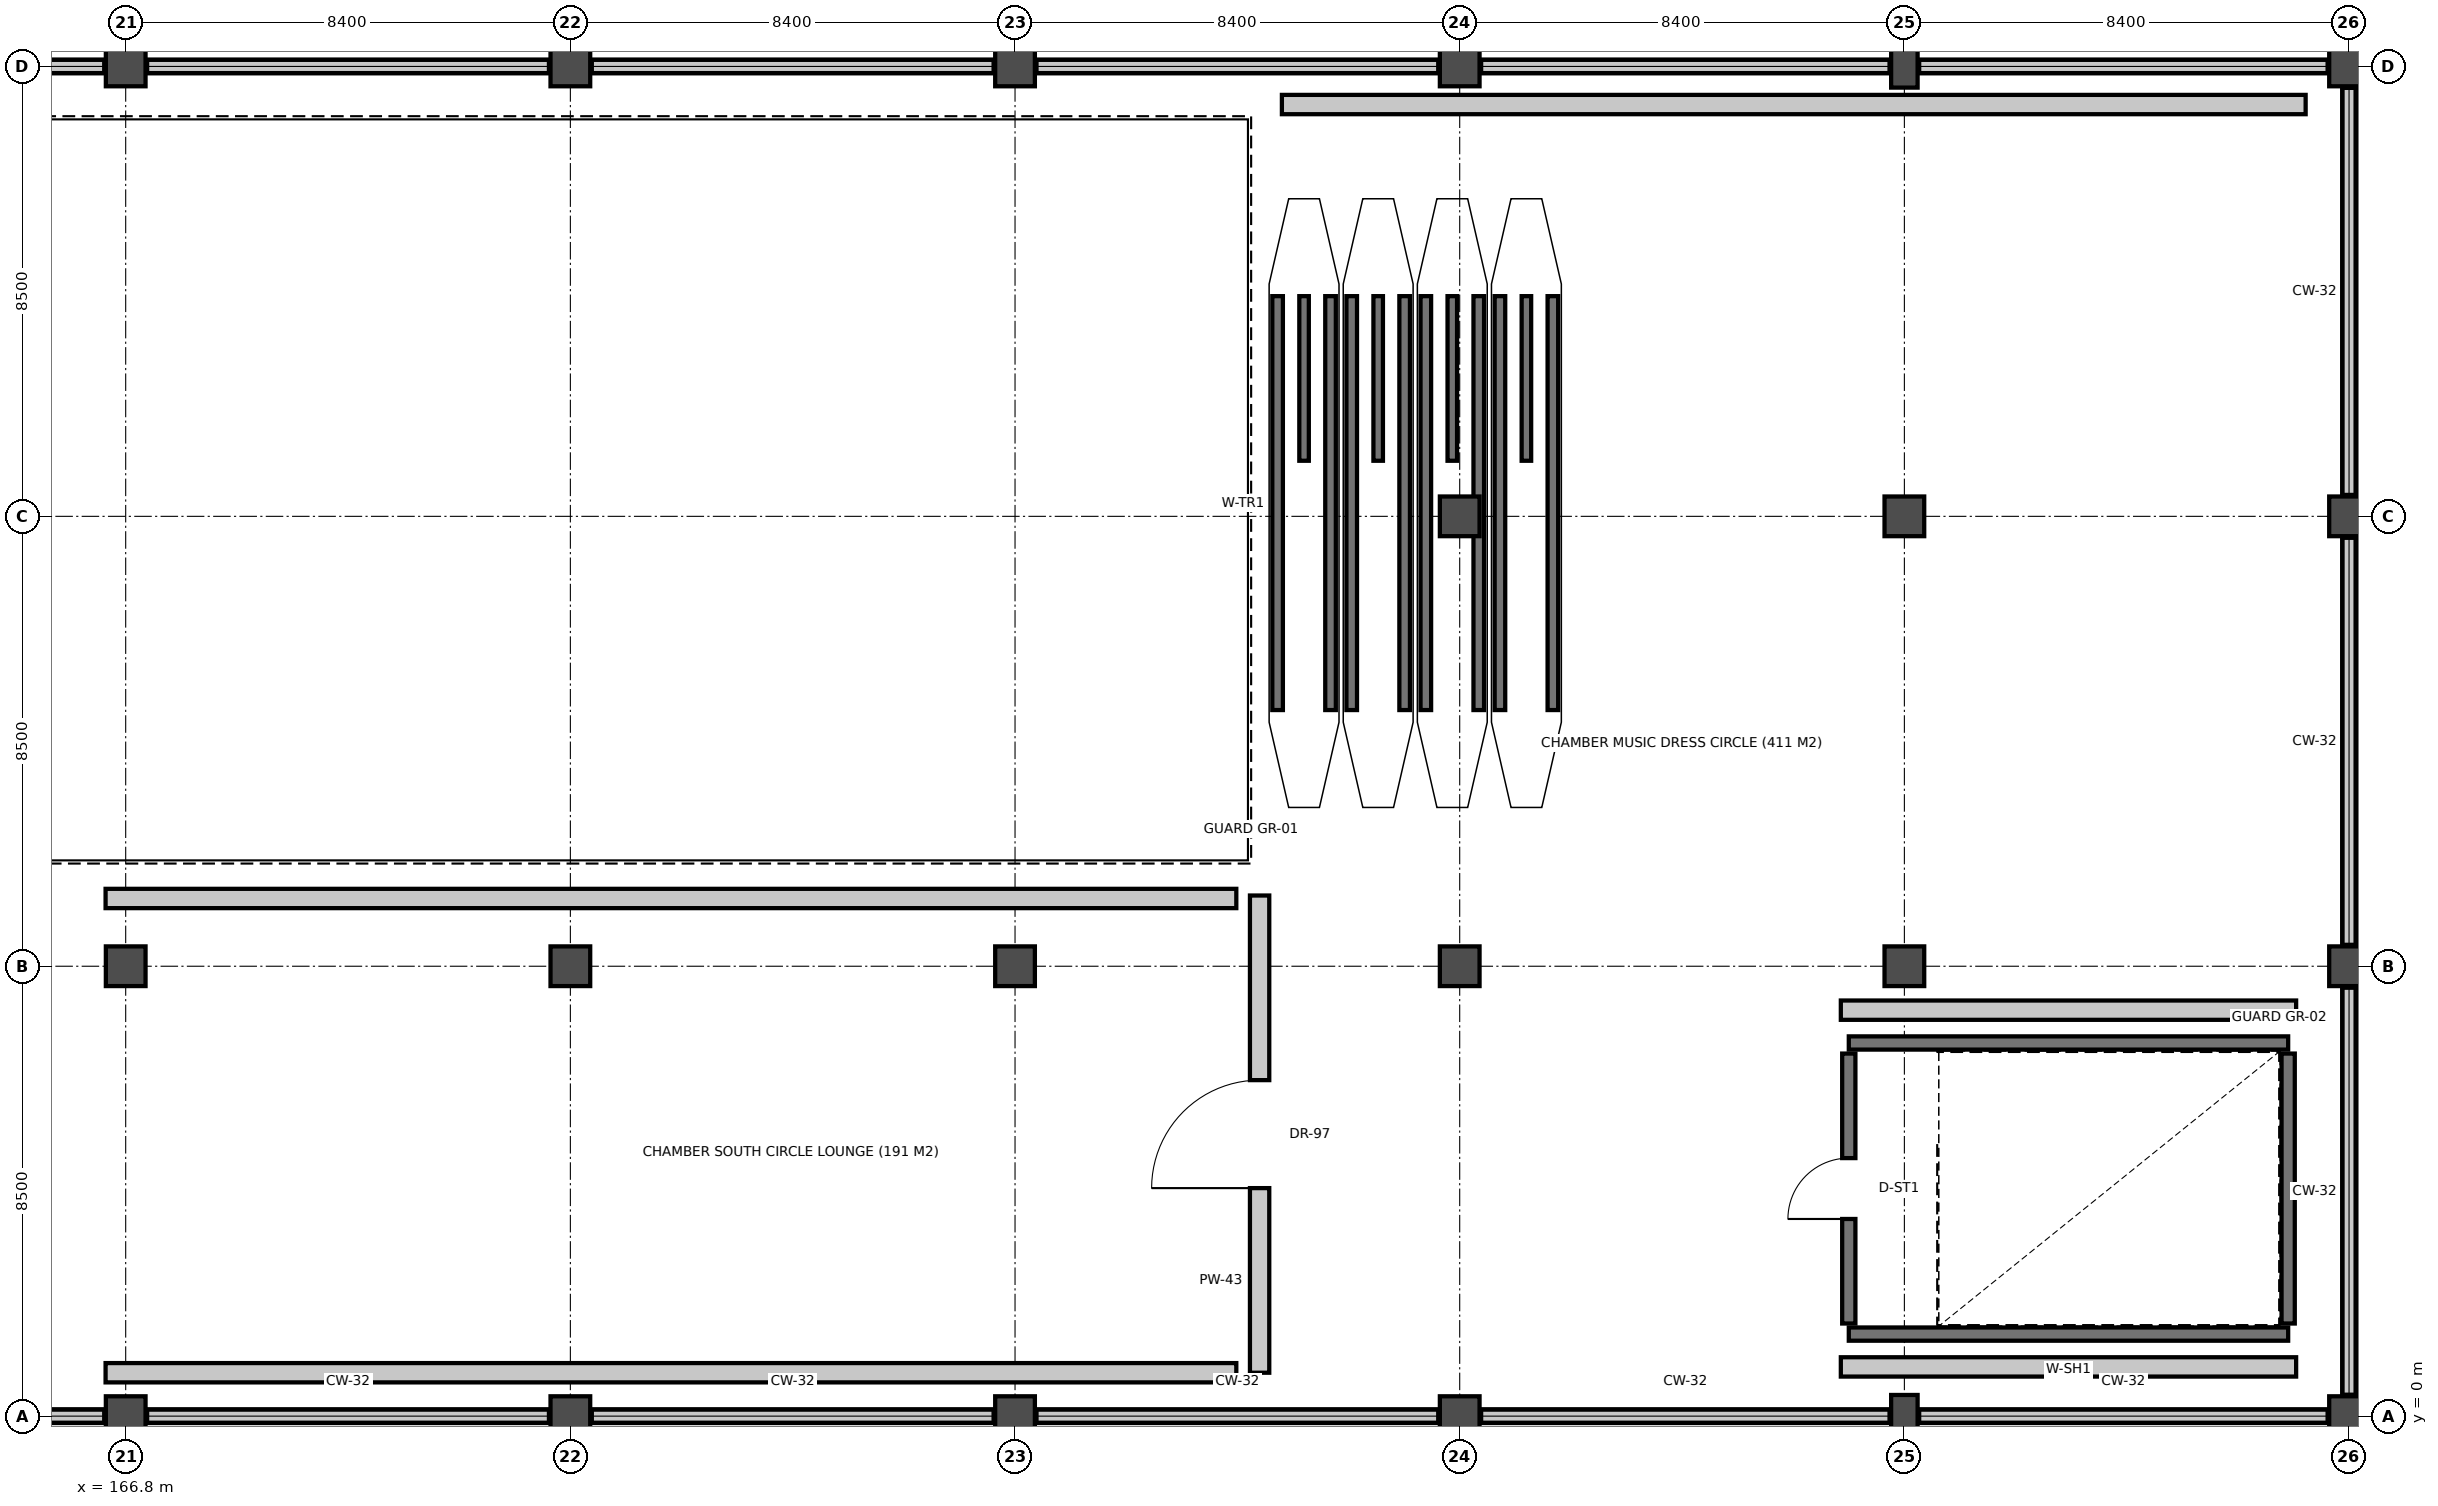
"""IFC4 building model, lengths in metres.
Left out: names, types, materials, properties, quantities, classifications, styles, units other than length and angle.
Written with IfcOpenShell. Run it as: python <this file> out.ifc"""

import sys

from ifc_helpers import new_model, si_unit, direction, frame, frame_2d, origin, origin_2d, place, context, subcontext, project, spatial, rectangle, extrude, element, fill, save


model = new_model("IFC4")
c1 = context("Model", 3, precision=1e-05, world=origin(), true_north=direction((0.0, 1.0)))
c2 = subcontext(c1, "Body", "Model", "MODEL_VIEW")
j1 = project(units=[si_unit("LENGTHUNIT", "METRE"), si_unit("PLANEANGLEUNIT", "RADIAN")], contexts=[c1])
p1 = place(None, origin())
s1 = spatial("IfcSite", under=j1, at=p1, CompositionType="ELEMENT")
p2 = place(p1, origin())
s2 = spatial("IfcBuilding", under=s1, at=p2, CompositionType="ELEMENT")
p3 = place(p2, frame((0.0, 0.0, 10.2)))
s3 = spatial("IfcBuildingStorey", under=s2, at=p3, CompositionType="ELEMENT", Elevation=10.2)
for number, where, z_axis, x_axis in (
    (1, (166.8, 0.0, 0.0), (0.0, 0.0, 1.0), (1.0, 0.0, 0.0)),
    (2, (166.8, 8.5, 0.0), (0.0, 0.0, 1.0), (1.0, 0.0, 0.0)),
    (3, (166.8, 25.5, 0.0), (0.0, 0.0, 1.0), (1.0, 0.0, 0.0)),
    (4, (175.2, 0.0, 0.0), (0.0, 0.0, 1.0), (1.0, 0.0, 0.0)),
    (5, (175.2, 8.5, 0.0), (0.0, 0.0, 1.0), (1.0, 0.0, 0.0)),
    (6, (175.2, 25.5, 0.0), (0.0, 0.0, 1.0), (1.0, 0.0, 0.0)),
    (7, (183.6, 0.0, 0.0), (0.0, 0.0, 1.0), (1.0, 0.0, 0.0)),
    (8, (183.6, 8.5, 0.0), (0.0, 0.0, 1.0), (1.0, 0.0, 0.0)),
    (9, (183.6, 25.5, 0.0), (0.0, 0.0, 1.0), (1.0, 0.0, 0.0)),
    (10, (192.0, 0.0, 0.0), (0.0, 0.0, 1.0), (1.0, 0.0, 0.0)),
    (11, (192.0, 8.5, 0.0), (0.0, 0.0, 1.0), (1.0, 0.0, 0.0)),
    (12, (192.0, 17.0, 0.0), (0.0, 0.0, 1.0), (1.0, 0.0, 0.0)),
    (13, (192.0, 25.5, 0.0), (0.0, 0.0, 1.0), (1.0, 0.0, 0.0)),
):
    element("IfcColumn", number, at=place(p3, frame(where, z_axis=z_axis, x_axis=x_axis)), inside=s3, PredefinedType="COLUMN", context=c2, shape_type="SweptSolid", body=[
        extrude(rectangle(XDim=0.75, YDim=0.75, at=origin_2d()), origin(), (0.0, 0.0, 1.0), 4.8),
    ])
p4 = place(p3, frame((200.4, 0.0, 0.0), z_axis=(0.0, 0.0, 1.0), x_axis=(1.0, 0.0, 0.0)))
e14 = element("IfcColumn", 14, at=p4, inside=s3, PredefinedType="PILASTER", context=c2, shape_type="SweptSolid", body=[
    extrude(rectangle(XDim=0.5, YDim=0.8, at=origin_2d()), origin(), (0.0, 0.0, 1.0), 4.8),
])
for number, where, z_axis, x_axis in (
    (15, (200.4, 8.5, 0.0), (0.0, 0.0, 1.0), (1.0, 0.0, 0.0)),
    (16, (200.4, 17.0, 0.0), (0.0, 0.0, 1.0), (1.0, 0.0, 0.0)),
):
    element("IfcColumn", number, at=place(p3, frame(where, z_axis=z_axis, x_axis=x_axis)), inside=s3, PredefinedType="COLUMN", context=c2, shape_type="SweptSolid", body=[
        extrude(rectangle(XDim=0.75, YDim=0.75, at=origin_2d()), origin(), (0.0, 0.0, 1.0), 4.8),
    ])
p5 = place(p3, frame((200.4, 25.5, 0.0), z_axis=(0.0, 0.0, 1.0), x_axis=(1.0, 0.0, 0.0)))
e17 = element("IfcColumn", 17, at=p5, inside=s3, PredefinedType="PILASTER", context=c2, shape_type="SweptSolid", body=[
    extrude(rectangle(XDim=0.5, YDim=0.8, at=origin_2d()), origin(), (0.0, 0.0, 1.0), 4.8),
])
for number, where, z_axis, x_axis in (
    (18, (208.8, 0.0, 0.0), (0.0, 0.0, 1.0), (1.0, 0.0, 0.0)),
    (19, (208.8, 8.5, 0.0), (0.0, 0.0, 1.0), (1.0, 0.0, 0.0)),
    (20, (208.8, 17.0, 0.0), (0.0, 0.0, 1.0), (1.0, 0.0, 0.0)),
    (21, (208.8, 25.5, 0.0), (0.0, 0.0, 1.0), (1.0, 0.0, 0.0)),
):
    element("IfcColumn", number, at=place(p3, frame(where, z_axis=z_axis, x_axis=x_axis)), inside=s3, PredefinedType="COLUMN", context=c2, shape_type="SweptSolid", body=[
        extrude(rectangle(XDim=0.75, YDim=0.75, at=origin_2d()), origin(), (0.0, 0.0, 1.0), 4.8),
    ])
for number, where, z_axis, x_axis in (
    (22, (188.56, 13.34, 0.0), (0.0, 0.0, 1.0), (0.0, 1.0, 0.0)),
    (23, (189.56, 13.34, 0.0), (0.0, 0.0, 1.0), (0.0, 1.0, 0.0)),
):
    element("IfcWall", number, at=place(p3, frame(where, z_axis=z_axis, x_axis=x_axis)), inside=s3, PredefinedType="SHEAR", context=c2, shape_type="SweptSolid", body=[
        extrude(rectangle(XDim=7.82, YDim=0.2, at=frame_2d((3.91, 0.0))), origin(), (0.0, 0.0, 1.0), 0.21),
    ])
p6 = place(p3, frame((189.06, 18.05, 0.0), z_axis=(0.0, 0.0, 1.0), x_axis=(0.0, 1.0, 0.0)))
e24 = element("IfcWall", 24, at=p6, inside=s3, PredefinedType="SHEAR", context=c2, shape_type="SweptSolid", body=[
    extrude(rectangle(XDim=3.11, YDim=0.18, at=frame_2d((1.555, 0.0))), origin(), (0.0, 0.0, 1.0), 0.21),
])
for number, where, z_axis, x_axis in (
    (25, (189.96, 13.34, 0.0), (0.0, 0.0, 1.0), (0.0, 1.0, 0.0)),
    (26, (190.96, 13.34, 0.0), (0.0, 0.0, 1.0), (0.0, 1.0, 0.0)),
):
    element("IfcWall", number, at=place(p3, frame(where, z_axis=z_axis, x_axis=x_axis)), inside=s3, PredefinedType="SHEAR", context=c2, shape_type="SweptSolid", body=[
        extrude(rectangle(XDim=7.82, YDim=0.2, at=frame_2d((3.91, 0.0))), origin(), (0.0, 0.0, 1.0), 0.39),
    ])
p7 = place(p3, frame((190.46, 18.05, 0.0), z_axis=(0.0, 0.0, 1.0), x_axis=(0.0, 1.0, 0.0)))
e27 = element("IfcWall", 27, at=p7, inside=s3, PredefinedType="SHEAR", context=c2, shape_type="SweptSolid", body=[
    extrude(rectangle(XDim=3.11, YDim=0.18, at=frame_2d((1.555, 0.0))), origin(), (0.0, 0.0, 1.0), 0.39),
])
for number, where, z_axis, x_axis in (
    (28, (191.36, 13.34, 0.0), (0.0, 0.0, 1.0), (0.0, 1.0, 0.0)),
    (29, (192.36, 13.34, 0.0), (0.0, 0.0, 1.0), (0.0, 1.0, 0.0)),
):
    element("IfcWall", number, at=place(p3, frame(where, z_axis=z_axis, x_axis=x_axis)), inside=s3, PredefinedType="SHEAR", context=c2, shape_type="SweptSolid", body=[
        extrude(rectangle(XDim=7.82, YDim=0.2, at=frame_2d((3.91, 0.0))), origin(), (0.0, 0.0, 1.0), 0.57),
    ])
p8 = place(p3, frame((191.86, 18.05, 0.0), z_axis=(0.0, 0.0, 1.0), x_axis=(0.0, 1.0, 0.0)))
e30 = element("IfcWall", 30, at=p8, inside=s3, PredefinedType="SHEAR", context=c2, shape_type="SweptSolid", body=[
    extrude(rectangle(XDim=3.11, YDim=0.18, at=frame_2d((1.555, 0.0))), origin(), (0.0, 0.0, 1.0), 0.57),
])
for number, where, z_axis, x_axis in (
    (31, (192.76, 13.34, 0.0), (0.0, 0.0, 1.0), (0.0, 1.0, 0.0)),
    (32, (193.76, 13.34, 0.0), (0.0, 0.0, 1.0), (0.0, 1.0, 0.0)),
):
    element("IfcWall", number, at=place(p3, frame(where, z_axis=z_axis, x_axis=x_axis)), inside=s3, PredefinedType="SHEAR", context=c2, shape_type="SweptSolid", body=[
        extrude(rectangle(XDim=7.82, YDim=0.2, at=frame_2d((3.91, 0.0))), origin(), (0.0, 0.0, 1.0), 0.75),
    ])
p9 = place(p3, frame((193.26, 18.05, 0.0), z_axis=(0.0, 0.0, 1.0), x_axis=(0.0, 1.0, 0.0)))
e33 = element("IfcWall", 33, at=p9, inside=s3, PredefinedType="SHEAR", context=c2, shape_type="SweptSolid", body=[
    extrude(rectangle(XDim=3.11, YDim=0.18, at=frame_2d((1.555, 0.0))), origin(), (0.0, 0.0, 1.0), 0.75),
])
p10 = place(p3, frame((158.67, 25.5, 0.0), z_axis=(0.0, 0.0, 1.0), x_axis=(1.0, 0.0, 0.0)))
e34 = element("IfcWall", 34, at=p10, inside=s3, PredefinedType="PARAPET", context=c2, shape_type="SweptSolid", body=[
    extrude(rectangle(XDim=7.735, YDim=0.26, at=frame_2d((3.868, 0.0))), origin(), (0.0, 0.0, 1.0), 1.12),
])
p11 = place(p3, frame((167.195, 25.5, 0.0), z_axis=(0.0, 0.0, 1.0), x_axis=(1.0, 0.0, 0.0)))
e35 = element("IfcWall", 35, at=p11, inside=s3, PredefinedType="PARAPET", context=c2, shape_type="SweptSolid", body=[
    extrude(rectangle(XDim=7.61, YDim=0.26, at=frame_2d((3.805, 0.0))), origin(), (0.0, 0.0, 1.0), 1.12),
])
p12 = place(p3, frame((175.595, 25.5, 0.0), z_axis=(0.0, 0.0, 1.0), x_axis=(1.0, 0.0, 0.0)))
e36 = element("IfcWall", 36, at=p12, inside=s3, PredefinedType="PARAPET", context=c2, shape_type="SweptSolid", body=[
    extrude(rectangle(XDim=7.61, YDim=0.26, at=frame_2d((3.805, 0.0))), origin(), (0.0, 0.0, 1.0), 1.12),
])
p13 = place(p3, frame((183.995, 25.5, 0.0), z_axis=(0.0, 0.0, 1.0), x_axis=(1.0, 0.0, 0.0)))
e37 = element("IfcWall", 37, at=p13, inside=s3, PredefinedType="PARAPET", context=c2, shape_type="SweptSolid", body=[
    extrude(rectangle(XDim=7.61, YDim=0.26, at=frame_2d((3.805, 0.0))), origin(), (0.0, 0.0, 1.0), 1.12),
])
p14 = place(p3, frame((192.395, 25.5, 0.0), z_axis=(0.0, 0.0, 1.0), x_axis=(1.0, 0.0, 0.0)))
e38 = element("IfcWall", 38, at=p14, inside=s3, PredefinedType="PARAPET", context=c2, shape_type="SweptSolid", body=[
    extrude(rectangle(XDim=7.735, YDim=0.26, at=frame_2d((3.867, 0.0))), origin(), (0.0, 0.0, 1.0), 1.12),
])
p15 = place(p3, frame((200.67, 25.5, 0.0), z_axis=(0.0, 0.0, 1.0), x_axis=(1.0, 0.0, 0.0)))
e39 = element("IfcWall", 39, at=p15, inside=s3, PredefinedType="PARAPET", context=c2, shape_type="SweptSolid", body=[
    extrude(rectangle(XDim=7.735, YDim=0.26, at=frame_2d((3.868, 0.0))), origin(), (0.0, 0.0, 1.0), 1.12),
])
for number, where, z_axis, x_axis in (
    (40, (208.8, 8.105, 0.0), (0.0, 0.0, 1.0), (0.0, -1.0, 0.0)),
    (41, (208.8, 16.605, 0.0), (0.0, 0.0, 1.0), (0.0, -1.0, 0.0)),
    (42, (208.8, 25.105, 0.0), (0.0, 0.0, 1.0), (0.0, -1.0, 0.0)),
):
    element("IfcWall", number, at=place(p3, frame(where, z_axis=z_axis, x_axis=x_axis)), inside=s3, PredefinedType="PARAPET", context=c2, shape_type="SweptSolid", body=[
        extrude(rectangle(XDim=7.71, YDim=0.26, at=frame_2d((3.855, 0.0))), origin(), (0.0, 0.0, 1.0), 1.12),
    ])
p16 = place(p3, frame((166.405, 0.0, 0.0), z_axis=(0.0, 0.0, 1.0), x_axis=(-1.0, 0.0, 0.0)))
e43 = element("IfcWall", 43, at=p16, inside=s3, PredefinedType="PARAPET", context=c2, shape_type="SweptSolid", body=[
    extrude(rectangle(XDim=7.735, YDim=0.26, at=frame_2d((3.868, 0.0))), origin(), (0.0, 0.0, 1.0), 1.12),
])
p17 = place(p3, frame((174.805, 0.0, 0.0), z_axis=(0.0, 0.0, 1.0), x_axis=(-1.0, 0.0, 0.0)))
e44 = element("IfcWall", 44, at=p17, inside=s3, PredefinedType="PARAPET", context=c2, shape_type="SweptSolid", body=[
    extrude(rectangle(XDim=7.61, YDim=0.26, at=frame_2d((3.805, 0.0))), origin(), (0.0, 0.0, 1.0), 1.12),
])
p18 = place(p3, frame((183.205, 0.0, 0.0), z_axis=(0.0, 0.0, 1.0), x_axis=(-1.0, 0.0, 0.0)))
e45 = element("IfcWall", 45, at=p18, inside=s3, PredefinedType="PARAPET", context=c2, shape_type="SweptSolid", body=[
    extrude(rectangle(XDim=7.61, YDim=0.26, at=frame_2d((3.805, 0.0))), origin(), (0.0, 0.0, 1.0), 1.12),
])
p19 = place(p3, frame((191.605, 0.0, 0.0), z_axis=(0.0, 0.0, 1.0), x_axis=(-1.0, 0.0, 0.0)))
e46 = element("IfcWall", 46, at=p19, inside=s3, PredefinedType="PARAPET", context=c2, shape_type="SweptSolid", body=[
    extrude(rectangle(XDim=7.61, YDim=0.26, at=frame_2d((3.805, 0.0))), origin(), (0.0, 0.0, 1.0), 1.12),
])
p20 = place(p3, frame((200.13, 0.0, 0.0), z_axis=(0.0, 0.0, 1.0), x_axis=(-1.0, 0.0, 0.0)))
e47 = element("IfcWall", 47, at=p20, inside=s3, PredefinedType="PARAPET", context=c2, shape_type="SweptSolid", body=[
    extrude(rectangle(XDim=7.735, YDim=0.26, at=frame_2d((3.867, 0.0))), origin(), (0.0, 0.0, 1.0), 1.12),
])
p21 = place(p3, frame((208.405, 0.0, 0.0), z_axis=(0.0, 0.0, 1.0), x_axis=(-1.0, 0.0, 0.0)))
e48 = element("IfcWall", 48, at=p21, inside=s3, PredefinedType="PARAPET", context=c2, shape_type="SweptSolid", body=[
    extrude(rectangle(XDim=7.735, YDim=0.26, at=frame_2d((3.868, 0.0))), origin(), (0.0, 0.0, 1.0), 1.12),
])
for number, where, z_axis, x_axis in (
    (49, (207.65, 1.55, 0.0), (0.0, 0.0, 1.0), (-1.0, 0.0, 0.0)),
    (50, (199.35, 7.05, 0.0), (0.0, 0.0, 1.0), (1.0, 0.0, 0.0)),
):
    element("IfcWall", number, at=place(p3, frame(where, z_axis=z_axis, x_axis=x_axis)), inside=s3, PredefinedType="SHEAR", context=c2, shape_type="SweptSolid", body=[
        extrude(rectangle(XDim=8.3, YDim=0.25, at=frame_2d((4.15, 0.0))), origin(), (0.0, 0.0, 1.0), 4.54),
    ])
p22 = place(p3, frame((199.35, 1.75, 0.0), z_axis=(0.0, 0.0, 1.0), x_axis=(0.0, 1.0, 0.0)))
e51 = element("IfcWall", 51, at=p22, inside=s3, PredefinedType="SHEAR", context=c2, shape_type="SweptSolid", body=[
    extrude(rectangle(XDim=5.1, YDim=0.25, at=frame_2d((2.55, 0.0))), origin(), (0.0, 0.0, 1.0), 4.54),
])
p23 = place(p22, frame((1.975, 0.0, 0.0)))
e52 = element("IfcOpeningElement", 52, at=p23, cuts=e51, PredefinedType="OPENING", context=c2, shape_type="SweptSolid", body=[
    extrude(rectangle(XDim=1.15, YDim=2.18, at=frame_2d((0.575, 1.09))), frame((0.0, 0.135, 0.0), z_axis=(0.0, -1.0, 0.0), x_axis=(1.0, 0.0, 0.0)), (0.0, 0.0, 1.0), 0.27),
])
p24 = place(p3, frame((207.65, 6.85, 0.0), z_axis=(0.0, 0.0, 1.0), x_axis=(0.0, -1.0, 0.0)))
e53 = element("IfcWall", 53, at=p24, inside=s3, PredefinedType="SHEAR", context=c2, shape_type="SweptSolid", body=[
    extrude(rectangle(XDim=5.1, YDim=0.25, at=frame_2d((2.55, 0.0))), origin(), (0.0, 0.0, 1.0), 4.54),
])
p25 = place(p3, frame((188.22, 0.82, 0.0), z_axis=(0.0, 0.0, 1.0), x_axis=(0.0, 1.0, 0.0)))
e54 = element("IfcWall", 54, at=p25, inside=s3, PredefinedType="PARTITIONING", context=c2, shape_type="SweptSolid", body=[
    extrude(rectangle(XDim=9.016, YDim=0.365, at=frame_2d((4.508, 0.0))), origin(), (0.0, 0.0, 1.0), 3.46),
])
p26 = place(p25, frame((3.488, 0.0, 0.0)))
e55 = element("IfcOpeningElement", 55, at=p26, cuts=e54, PredefinedType="OPENING", context=c2, shape_type="SweptSolid", body=[
    extrude(rectangle(XDim=2.04, YDim=2.4, at=frame_2d((1.02, 1.2))), frame((0.0, 0.192, 0.0), z_axis=(0.0, -1.0, 0.0), x_axis=(1.0, 0.0, 0.0)), (0.0, 0.0, 1.0), 0.385),
])
p27 = place(p3, frame((188.641, 24.78, 0.0), z_axis=(0.0, 0.0, 1.0), x_axis=(1.0, 0.0, 0.0)))
e56 = element("IfcWall", 56, at=p27, inside=s3, PredefinedType="PARTITIONING", context=c2, shape_type="SweptSolid", body=[
    extrude(rectangle(XDim=19.339, YDim=0.365, at=frame_2d((9.669, 0.0))), origin(), (0.0, 0.0, 1.0), 3.46),
])
for number, where, z_axis, x_axis in (
    (57, (207.801, 7.67, 0.0), (0.0, 0.0, 1.0), (-1.0, 0.0, 0.0)),
    (58, (199.199, 0.93, 0.0), (0.0, 0.0, 1.0), (1.0, 0.0, 0.0)),
):
    element("IfcWall", number, at=place(p3, frame(where, z_axis=z_axis, x_axis=x_axis)), inside=s3, PredefinedType="PARTITIONING", context=c2, shape_type="SweptSolid", body=[
        extrude(rectangle(XDim=8.601, YDim=0.365, at=frame_2d((4.301, 0.0))), origin(), (0.0, 0.0, 1.0), 3.46),
    ])
for number, where, z_axis, x_axis in (
    (59, (166.42, 9.78, 0.0), (0.0, 0.0, 1.0), (1.0, 0.0, 0.0)),
    (60, (187.78, 0.82, 0.0), (0.0, 0.0, 1.0), (-1.0, 0.0, 0.0)),
):
    element("IfcWall", number, at=place(p3, frame(where, z_axis=z_axis, x_axis=x_axis)), inside=s3, PredefinedType="PARTITIONING", context=c2, shape_type="SweptSolid", body=[
        extrude(rectangle(XDim=21.36, YDim=0.365, at=frame_2d((10.68, 0.0))), origin(), (0.0, 0.0, 1.0), 3.46),
    ])
p28 = place(p23, origin())
e61 = element("IfcDoor", 61, at=p28, inside=s3, OperationType="SINGLE_SWING_LEFT", PredefinedType="DOOR", context=c2, shape_type="SweptSolid", body=[
    extrude(rectangle(XDim=1.15, YDim=2.18, at=frame_2d((0.575, 1.09))), frame((0.0, 0.025, 0.0), z_axis=(0.0, -1.0, 0.0), x_axis=(1.0, 0.0, 0.0)), (0.0, 0.0, 1.0), 0.05),
])
fill(e52, e61)
p29 = place(p26, origin())
e62 = element("IfcDoor", 62, at=p29, inside=s3, OperationType="SINGLE_SWING_LEFT", PredefinedType="DOOR", context=c2, shape_type="SweptSolid", body=[
    extrude(rectangle(XDim=2.04, YDim=2.4, at=frame_2d((1.02, 1.2))), frame((0.0, 0.025, 0.0), z_axis=(0.0, -1.0, 0.0), x_axis=(1.0, 0.0, 0.0)), (0.0, 0.0, 1.0), 0.05),
])
fill(e55, e62)
save(model, sys.argv[1])
